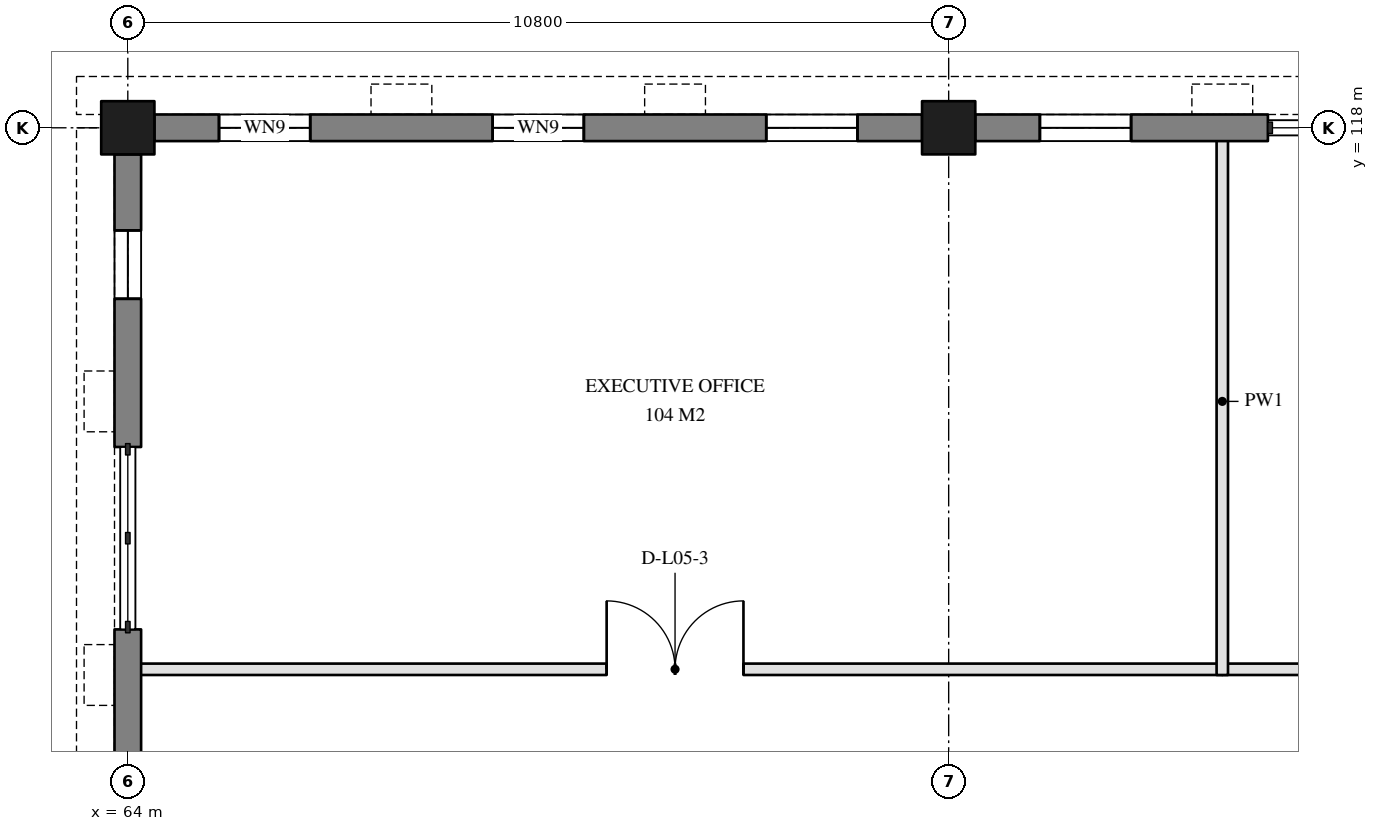
"""IFC4 building model, lengths in metres.
Left out: names, types, materials, properties, quantities, classifications, styles, units other than length and angle.
Written with IfcOpenShell. Run it as: python <this file> out.ifc"""

import sys

from ifc_helpers import new_model, si_unit, direction, frame, frame_2d, origin, origin_2d, place, context, subcontext, project, spatial, rectangle, extrude, element, fill, save


model = new_model("IFC4")
c1 = context("Model", 3, precision=1e-05, world=origin(), true_north=direction((0.0, 1.0)))
c2 = subcontext(c1, "Body", "Model", "MODEL_VIEW")
j1 = project(units=[si_unit("LENGTHUNIT", "METRE"), si_unit("PLANEANGLEUNIT", "RADIAN")], contexts=[c1])
p1 = place(None, origin())
s1 = spatial("IfcSite", under=j1, at=p1, CompositionType="ELEMENT")
p2 = place(p1, origin())
s2 = spatial("IfcBuilding", under=s1, at=p2, CompositionType="ELEMENT")
p3 = place(p2, frame((0.0, 0.0, 20.4)))
s3 = spatial("IfcBuildingStorey", under=s2, at=p3, CompositionType="ELEMENT", Elevation=20.4)
for number, where, z_axis, x_axis in (
    (1, (64.0, 118.0, 0.0), (0.0, 0.0, 1.0), (1.0, 0.0, 0.0)),
    (2, (74.8, 118.0, 0.0), (0.0, 0.0, 1.0), (1.0, 0.0, 0.0)),
):
    element("IfcColumn", number, at=place(p3, frame(where, z_axis=z_axis, x_axis=x_axis)), inside=s3, PredefinedType="COLUMN", context=c2, shape_type="SweptSolid", body=[
        extrude(rectangle(XDim=0.7, YDim=0.7, at=origin_2d()), origin(), (0.0, 0.0, 1.0), 3.9),
    ])
p4 = place(p3, frame((64.35, 118.0, 0.0), z_axis=(0.0, 0.0, 1.0), x_axis=(1.0, 0.0, 0.0)))
e3 = element("IfcWall", 3, at=p4, inside=s3, PredefinedType="SOLIDWALL", context=c2, shape_type="SweptSolid", body=[
    extrude(rectangle(XDim=10.1, YDim=0.35, at=frame_2d((5.05, 0.0))), origin(), (0.0, 0.0, 1.0), 2.8),
])
p5 = place(p4, frame((0.85, 0.0, 0.9)))
e4 = element("IfcOpeningElement", 4, at=p5, cuts=e3, PredefinedType="OPENING", context=c2, shape_type="SweptSolid", body=[
    extrude(rectangle(XDim=1.2, YDim=1.8, at=frame_2d((0.6, 0.9))), frame((0.0, 0.185, 0.0), z_axis=(0.0, -1.0, 0.0), x_axis=(1.0, 0.0, 0.0)), (0.0, 0.0, 1.0), 0.37),
])
p6 = place(p4, frame((4.45, 0.0, 0.9)))
e5 = element("IfcOpeningElement", 5, at=p6, cuts=e3, PredefinedType="OPENING", context=c2, shape_type="SweptSolid", body=[
    extrude(rectangle(XDim=1.2, YDim=1.8, at=frame_2d((0.6, 0.9))), frame((0.0, 0.185, 0.0), z_axis=(0.0, -1.0, 0.0), x_axis=(1.0, 0.0, 0.0)), (0.0, 0.0, 1.0), 0.37),
])
p7 = place(p4, frame((8.05, 0.0, 0.9)))
e6 = element("IfcOpeningElement", 6, at=p7, cuts=e3, PredefinedType="OPENING", context=c2, shape_type="SweptSolid", body=[
    extrude(rectangle(XDim=1.2, YDim=1.8, at=frame_2d((0.6, 0.9))), frame((0.0, 0.185, 0.0), z_axis=(0.0, -1.0, 0.0), x_axis=(1.0, 0.0, 0.0)), (0.0, 0.0, 1.0), 0.37),
])
p8 = place(p3, frame((75.15, 118.0, 0.0), z_axis=(0.0, 0.0, 1.0), x_axis=(1.0, 0.0, 0.0)))
e7 = element("IfcWall", 7, at=p8, inside=s3, PredefinedType="SOLIDWALL", context=c2, shape_type="SweptSolid", body=[
    extrude(rectangle(XDim=3.85, YDim=0.35, at=frame_2d((1.925, 0.0))), origin(), (0.0, 0.0, 1.0), 2.8),
])
p9 = place(p8, frame((0.85, 0.0, 0.9)))
e8 = element("IfcOpeningElement", 8, at=p9, cuts=e7, PredefinedType="OPENING", context=c2, shape_type="SweptSolid", body=[
    extrude(rectangle(XDim=1.2, YDim=1.8, at=frame_2d((0.6, 0.9))), frame((0.0, 0.185, 0.0), z_axis=(0.0, -1.0, 0.0), x_axis=(1.0, 0.0, 0.0)), (0.0, 0.0, 1.0), 0.37),
])
p10 = place(p3, frame((64.0, 107.55, 0.0), z_axis=(0.0, 0.0, 1.0), x_axis=(0.0, 1.0, 0.0)))
e9 = element("IfcWall", 9, at=p10, inside=s3, PredefinedType="SOLIDWALL", context=c2, shape_type="SweptSolid", body=[
    extrude(rectangle(XDim=3.85, YDim=0.35, at=frame_2d((1.925, 0.0))), origin(), (0.0, 0.0, 1.0), 2.8),
])
p11 = place(p10, frame((1.0, 0.0, 0.9)))
e10 = element("IfcOpeningElement", 10, at=p11, cuts=e9, PredefinedType="OPENING", context=c2, shape_type="SweptSolid", body=[
    extrude(rectangle(XDim=0.9, YDim=1.8, at=frame_2d((0.45, 0.9))), frame((0.0, 0.185, 0.0), z_axis=(0.0, -1.0, 0.0), x_axis=(1.0, 0.0, 0.0)), (0.0, 0.0, 1.0), 0.37),
])
p12 = place(p3, frame((64.0, 113.8, 0.0), z_axis=(0.0, 0.0, 1.0), x_axis=(0.0, 1.0, 0.0)))
e11 = element("IfcWall", 11, at=p12, inside=s3, PredefinedType="SOLIDWALL", context=c2, shape_type="SweptSolid", body=[
    extrude(rectangle(XDim=3.85, YDim=0.35, at=frame_2d((1.925, 0.0))), origin(), (0.0, 0.0, 1.0), 2.8),
])
p13 = place(p12, frame((1.95, 0.0, 0.9)))
e12 = element("IfcOpeningElement", 12, at=p13, cuts=e11, PredefinedType="OPENING", context=c2, shape_type="SweptSolid", body=[
    extrude(rectangle(XDim=0.9, YDim=1.8, at=frame_2d((0.45, 0.9))), frame((0.0, 0.185, 0.0), z_axis=(0.0, -1.0, 0.0), x_axis=(1.0, 0.0, 0.0)), (0.0, 0.0, 1.0), 0.37),
])
p14 = place(p3, frame((64.0, 110.875, 0.0), z_axis=(0.0, 0.0, 1.0), x_axis=(1.0, 0.0, 0.0)))
e13 = element("IfcWall", 13, at=p14, inside=s3, PredefinedType="PARTITIONING", context=c2, shape_type="SweptSolid", body=[
    extrude(rectangle(XDim=14.4, YDim=0.15, at=frame_2d((7.2, 0.0))), origin(), (0.0, 0.0, 1.0), 2.8),
])
p15 = place(p14, frame((6.3, 0.0, 0.0)))
e14 = element("IfcOpeningElement", 14, at=p15, cuts=e13, PredefinedType="OPENING", context=c2, shape_type="SweptSolid", body=[
    extrude(rectangle(XDim=1.8, YDim=2.1, at=frame_2d((0.9, 1.05))), frame((0.0, 0.085, 0.0), z_axis=(0.0, -1.0, 0.0), x_axis=(1.0, 0.0, 0.0)), (0.0, 0.0, 1.0), 0.17),
])
p16 = place(p3, frame((78.4, 110.875, 0.0), z_axis=(0.0, 0.0, 1.0), x_axis=(1.0, 0.0, 0.0)))
e15 = element("IfcWall", 15, at=p16, inside=s3, PredefinedType="PARTITIONING", context=c2, shape_type="SweptSolid", body=[
    extrude(rectangle(XDim=10.8, YDim=0.15, at=frame_2d((5.4, 0.0))), origin(), (0.0, 0.0, 1.0), 2.8),
])
p17 = place(p16, frame((4.9, 0.0, 0.0)))
e16 = element("IfcOpeningElement", 16, at=p17, cuts=e15, PredefinedType="OPENING", context=c2, shape_type="SweptSolid", body=[
    extrude(rectangle(XDim=1.0, YDim=2.1, at=frame_2d((0.5, 1.05))), frame((0.0, 0.085, 0.0), z_axis=(0.0, -1.0, 0.0), x_axis=(1.0, 0.0, 0.0)), (0.0, 0.0, 1.0), 0.17),
])
p18 = place(p3, frame((78.4, 110.8, 0.0), z_axis=(0.0, 0.0, 1.0), x_axis=(0.0, 1.0, 0.0)))
e17 = element("IfcWall", 17, at=p18, inside=s3, PredefinedType="PARTITIONING", context=c2, shape_type="SweptSolid", body=[
    extrude(rectangle(XDim=7.2, YDim=0.15, at=frame_2d((3.6, 0.0))), origin(), (0.0, 0.0, 1.0), 2.8),
])
p19 = place(p5, origin())
e18 = element("IfcWindow", 18, at=p19, inside=s3, PartitioningType="SINGLE_PANEL", PredefinedType="WINDOW", context=c2, shape_type="SweptSolid", body=[
    extrude(rectangle(XDim=1.2, YDim=1.8, at=frame_2d((0.6, 0.9))), frame((0.0, 0.03, 0.0), z_axis=(0.0, -1.0, 0.0), x_axis=(1.0, 0.0, 0.0)), (0.0, 0.0, 1.0), 0.06),
])
fill(e4, e18)
p20 = place(p6, origin())
e19 = element("IfcWindow", 19, at=p20, inside=s3, PartitioningType="SINGLE_PANEL", PredefinedType="WINDOW", context=c2, shape_type="SweptSolid", body=[
    extrude(rectangle(XDim=1.2, YDim=1.8, at=frame_2d((0.6, 0.9))), frame((0.0, 0.03, 0.0), z_axis=(0.0, -1.0, 0.0), x_axis=(1.0, 0.0, 0.0)), (0.0, 0.0, 1.0), 0.06),
])
fill(e5, e19)
p21 = place(p7, origin())
e20 = element("IfcWindow", 20, at=p21, inside=s3, PartitioningType="SINGLE_PANEL", PredefinedType="WINDOW", context=c2, shape_type="SweptSolid", body=[
    extrude(rectangle(XDim=1.2, YDim=1.8, at=frame_2d((0.6, 0.9))), frame((0.0, 0.03, 0.0), z_axis=(0.0, -1.0, 0.0), x_axis=(1.0, 0.0, 0.0)), (0.0, 0.0, 1.0), 0.06),
])
fill(e6, e20)
p22 = place(p9, origin())
e21 = element("IfcWindow", 21, at=p22, inside=s3, PartitioningType="SINGLE_PANEL", PredefinedType="WINDOW", context=c2, shape_type="SweptSolid", body=[
    extrude(rectangle(XDim=1.2, YDim=1.8, at=frame_2d((0.6, 0.9))), frame((0.0, 0.03, 0.0), z_axis=(0.0, -1.0, 0.0), x_axis=(1.0, 0.0, 0.0)), (0.0, 0.0, 1.0), 0.06),
])
fill(e8, e21)
p23 = place(p13, origin())
e22 = element("IfcWindow", 22, at=p23, inside=s3, PartitioningType="SINGLE_PANEL", PredefinedType="WINDOW", context=c2, shape_type="SweptSolid", body=[
    extrude(rectangle(XDim=0.9, YDim=1.8, at=frame_2d((0.45, 0.9))), frame((0.0, 0.03, 0.0), z_axis=(0.0, -1.0, 0.0), x_axis=(1.0, 0.0, 0.0)), (0.0, 0.0, 1.0), 0.06),
])
fill(e12, e22)
p24 = place(p15, origin())
e23 = element("IfcDoor", 23, at=p24, inside=s3, OperationType="DOUBLE_DOOR_DOUBLE_SWING", PredefinedType="DOOR", context=c2, shape_type="SweptSolid", body=[
    extrude(rectangle(XDim=1.8, YDim=2.1, at=frame_2d((0.9, 1.05))), frame((0.0, 0.025, 0.0), z_axis=(0.0, -1.0, 0.0), x_axis=(1.0, 0.0, 0.0)), (0.0, 0.0, 1.0), 0.05),
])
fill(e14, e23)
save(model, sys.argv[1])
